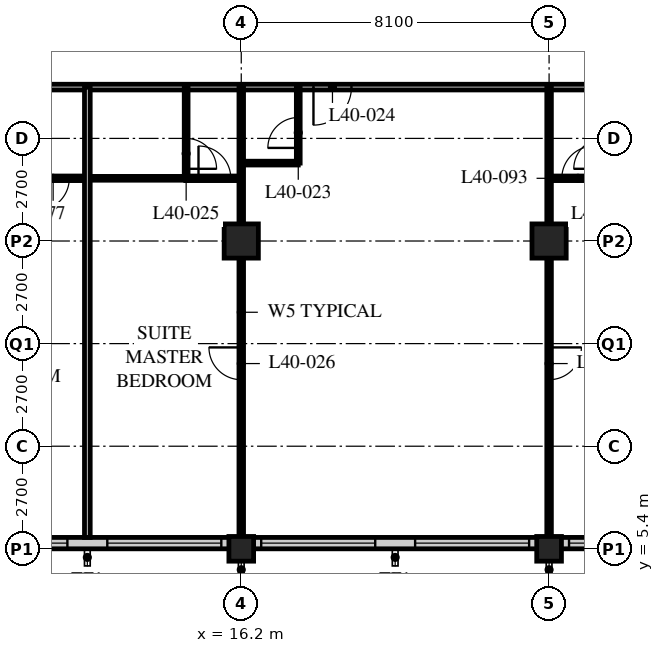
"""IFC4 building model, lengths in metres.
Left out: names, types, materials, properties, quantities, classifications, styles, units other than length and angle.
Written with IfcOpenShell. Run it as: python <this file> out.ifc"""

import sys

from ifc_helpers import new_model, si_unit, direction, frame, frame_2d, origin, origin_2d, place, context, subcontext, project, spatial, rectangle, hollow_rectangle, extrude, element, fill, save


model = new_model("IFC4")
c1 = context("Model", 3, precision=1e-05, world=origin(), true_north=direction((0.0, 1.0)))
c2 = subcontext(c1, "Body", "Model", "MODEL_VIEW")
j1 = project(units=[si_unit("LENGTHUNIT", "METRE"), si_unit("PLANEANGLEUNIT", "RADIAN")], contexts=[c1])
p1 = place(None, origin())
s1 = spatial("IfcSite", under=j1, at=p1, CompositionType="ELEMENT")
p2 = place(p1, origin())
s2 = spatial("IfcBuilding", under=s1, at=p2, CompositionType="ELEMENT")
p3 = place(p2, frame((0.0, 0.0, 154.4)))
s3 = spatial("IfcBuildingStorey", under=s2, at=p3, CompositionType="ELEMENT", Elevation=154.4)
p4 = place(p3, frame((16.2, 5.4, 0.0), z_axis=(0.0, 0.0, 1.0), x_axis=(1.0, 0.0, 0.0)))
e1 = element("IfcColumn", 1, at=p4, inside=s3, PredefinedType="COLUMN", context=c2, shape_type="SweptSolid", body=[
    extrude(hollow_rectangle(XDim=0.65, YDim=0.65, WallThickness=0.055, at=origin_2d()), origin(), (0.0, 0.0, 1.0), 3.4),
])
p5 = place(p3, frame((16.2, 13.5, 0.0), z_axis=(0.0, 0.0, 1.0), x_axis=(1.0, 0.0, 0.0)))
e2 = element("IfcColumn", 2, at=p5, inside=s3, PredefinedType="COLUMN", context=c2, shape_type="SweptSolid", body=[
    extrude(hollow_rectangle(XDim=0.9, YDim=0.9, WallThickness=0.1, at=origin_2d()), origin(), (0.0, 0.0, 1.0), 3.4),
])
p6 = place(p3, frame((24.3, 5.4, 0.0), z_axis=(0.0, 0.0, 1.0), x_axis=(1.0, 0.0, 0.0)))
e3 = element("IfcColumn", 3, at=p6, inside=s3, PredefinedType="COLUMN", context=c2, shape_type="SweptSolid", body=[
    extrude(hollow_rectangle(XDim=0.65, YDim=0.65, WallThickness=0.055, at=origin_2d()), origin(), (0.0, 0.0, 1.0), 3.4),
])
p7 = place(p3, frame((24.3, 13.5, 0.0), z_axis=(0.0, 0.0, 1.0), x_axis=(1.0, 0.0, 0.0)))
e4 = element("IfcColumn", 4, at=p7, inside=s3, PredefinedType="COLUMN", context=c2, shape_type="SweptSolid", body=[
    extrude(hollow_rectangle(XDim=0.9, YDim=0.9, WallThickness=0.1, at=origin_2d()), origin(), (0.0, 0.0, 1.0), 3.4),
])
p8 = place(p3, frame((8.4, 5.55, 0.0), z_axis=(0.0, 0.0, 1.0), x_axis=(1.0, 0.0, 0.0)))
e5 = element("IfcWall", 5, at=p8, inside=s3, PredefinedType="SOLIDWALL", context=c2, shape_type="SweptSolid", body=[
    extrude(rectangle(XDim=40.2, YDim=0.3, at=frame_2d((20.1, 0.0))), origin(), (0.0, 0.0, 1.0), 2.15),
])
p9 = place(p8, frame((0.225, 0.0, 0.9)))
e6 = element("IfcOpeningElement", 6, at=p9, cuts=e5, PredefinedType="OPENING", context=c2, shape_type="SweptSolid", body=[
    extrude(rectangle(XDim=3.0, YDim=1.2, at=frame_2d((1.5, 0.6))), frame((0.0, 0.16, 0.0), z_axis=(0.0, -1.0, 0.0), x_axis=(1.0, 0.0, 0.0)), (0.0, 0.0, 1.0), 0.32),
])
p10 = place(p8, frame((4.275, 0.0, 0.9)))
e7 = element("IfcOpeningElement", 7, at=p10, cuts=e5, PredefinedType="OPENING", context=c2, shape_type="SweptSolid", body=[
    extrude(rectangle(XDim=3.0, YDim=1.2, at=frame_2d((1.5, 0.6))), frame((0.0, 0.16, 0.0), z_axis=(0.0, -1.0, 0.0), x_axis=(1.0, 0.0, 0.0)), (0.0, 0.0, 1.0), 0.32),
])
p11 = place(p8, frame((8.325, 0.0, 0.9)))
e8 = element("IfcOpeningElement", 8, at=p11, cuts=e5, PredefinedType="OPENING", context=c2, shape_type="SweptSolid", body=[
    extrude(rectangle(XDim=3.0, YDim=1.2, at=frame_2d((1.5, 0.6))), frame((0.0, 0.16, 0.0), z_axis=(0.0, -1.0, 0.0), x_axis=(1.0, 0.0, 0.0)), (0.0, 0.0, 1.0), 0.32),
])
p12 = place(p8, frame((12.375, 0.0, 0.9)))
e9 = element("IfcOpeningElement", 9, at=p12, cuts=e5, PredefinedType="OPENING", context=c2, shape_type="SweptSolid", body=[
    extrude(rectangle(XDim=3.0, YDim=1.2, at=frame_2d((1.5, 0.6))), frame((0.0, 0.16, 0.0), z_axis=(0.0, -1.0, 0.0), x_axis=(1.0, 0.0, 0.0)), (0.0, 0.0, 1.0), 0.32),
])
p13 = place(p8, frame((16.425, 0.0, 0.9)))
e10 = element("IfcOpeningElement", 10, at=p13, cuts=e5, PredefinedType="OPENING", context=c2, shape_type="SweptSolid", body=[
    extrude(rectangle(XDim=3.0, YDim=1.2, at=frame_2d((1.5, 0.6))), frame((0.0, 0.16, 0.0), z_axis=(0.0, -1.0, 0.0), x_axis=(1.0, 0.0, 0.0)), (0.0, 0.0, 1.0), 0.32),
])
p14 = place(p8, frame((20.475, 0.0, 0.9)))
e11 = element("IfcOpeningElement", 11, at=p14, cuts=e5, PredefinedType="OPENING", context=c2, shape_type="SweptSolid", body=[
    extrude(rectangle(XDim=3.0, YDim=1.2, at=frame_2d((1.5, 0.6))), frame((0.0, 0.16, 0.0), z_axis=(0.0, -1.0, 0.0), x_axis=(1.0, 0.0, 0.0)), (0.0, 0.0, 1.0), 0.32),
])
p15 = place(p8, frame((24.525, 0.0, 0.9)))
e12 = element("IfcOpeningElement", 12, at=p15, cuts=e5, PredefinedType="OPENING", context=c2, shape_type="SweptSolid", body=[
    extrude(rectangle(XDim=3.0, YDim=1.2, at=frame_2d((1.5, 0.6))), frame((0.0, 0.16, 0.0), z_axis=(0.0, -1.0, 0.0), x_axis=(1.0, 0.0, 0.0)), (0.0, 0.0, 1.0), 0.32),
])
p16 = place(p8, frame((28.575, 0.0, 0.9)))
e13 = element("IfcOpeningElement", 13, at=p16, cuts=e5, PredefinedType="OPENING", context=c2, shape_type="SweptSolid", body=[
    extrude(rectangle(XDim=3.0, YDim=1.2, at=frame_2d((1.5, 0.6))), frame((0.0, 0.16, 0.0), z_axis=(0.0, -1.0, 0.0), x_axis=(1.0, 0.0, 0.0)), (0.0, 0.0, 1.0), 0.32),
])
p17 = place(p8, frame((32.625, 0.0, 0.9)))
e14 = element("IfcOpeningElement", 14, at=p17, cuts=e5, PredefinedType="OPENING", context=c2, shape_type="SweptSolid", body=[
    extrude(rectangle(XDim=3.0, YDim=1.2, at=frame_2d((1.5, 0.6))), frame((0.0, 0.16, 0.0), z_axis=(0.0, -1.0, 0.0), x_axis=(1.0, 0.0, 0.0)), (0.0, 0.0, 1.0), 0.32),
])
p18 = place(p8, frame((36.675, 0.0, 0.9)))
e15 = element("IfcOpeningElement", 15, at=p18, cuts=e5, PredefinedType="OPENING", context=c2, shape_type="SweptSolid", body=[
    extrude(rectangle(XDim=3.0, YDim=1.2, at=frame_2d((1.5, 0.6))), frame((0.0, 0.16, 0.0), z_axis=(0.0, -1.0, 0.0), x_axis=(1.0, 0.0, 0.0)), (0.0, 0.0, 1.0), 0.32),
])
p19 = place(p3, frame((8.1, 17.55, 0.0), z_axis=(0.0, 0.0, 1.0), x_axis=(1.0, 0.0, 0.0)))
e16 = element("IfcWall", 16, at=p19, inside=s3, PredefinedType="PARTITIONING", context=c2, shape_type="SweptSolid", body=[
    extrude(rectangle(XDim=40.5, YDim=0.15, at=frame_2d((20.25, 0.0))), origin(), (0.0, 0.0, 1.0), 3.15),
])
p20 = place(p19, frame((10.0, 0.0, 0.0)))
e17 = element("IfcOpeningElement", 17, at=p20, cuts=e16, PredefinedType="OPENING", context=c2, shape_type="SweptSolid", body=[
    extrude(rectangle(XDim=1.0, YDim=2.1, at=frame_2d((0.5, 1.05))), frame((0.0, 0.085, 0.0), z_axis=(0.0, -1.0, 0.0), x_axis=(1.0, 0.0, 0.0)), (0.0, 0.0, 1.0), 0.17),
])
p21 = place(p19, frame((22.15, 0.0, 0.0)))
e18 = element("IfcOpeningElement", 18, at=p21, cuts=e16, PredefinedType="OPENING", context=c2, shape_type="SweptSolid", body=[
    extrude(rectangle(XDim=1.0, YDim=2.1, at=frame_2d((0.5, 1.05))), frame((0.0, 0.085, 0.0), z_axis=(0.0, -1.0, 0.0), x_axis=(1.0, 0.0, 0.0)), (0.0, 0.0, 1.0), 0.17),
])
p22 = place(p19, frame((30.8, 0.0, 0.0)))
e19 = element("IfcOpeningElement", 19, at=p22, cuts=e16, PredefinedType="OPENING", context=c2, shape_type="SweptSolid", body=[
    extrude(rectangle(XDim=1.0, YDim=2.1, at=frame_2d((0.5, 1.05))), frame((0.0, 0.085, 0.0), z_axis=(0.0, -1.0, 0.0), x_axis=(1.0, 0.0, 0.0)), (0.0, 0.0, 1.0), 0.17),
])
p23 = place(p19, frame((34.85, 0.0, 0.0)))
e20 = element("IfcOpeningElement", 20, at=p23, cuts=e16, PredefinedType="OPENING", context=c2, shape_type="SweptSolid", body=[
    extrude(rectangle(XDim=1.0, YDim=2.1, at=frame_2d((0.5, 1.05))), frame((0.0, 0.085, 0.0), z_axis=(0.0, -1.0, 0.0), x_axis=(1.0, 0.0, 0.0)), (0.0, 0.0, 1.0), 0.17),
])
p24 = place(p19, frame((1.525, 0.0, 0.0)))
e21 = element("IfcOpeningElement", 21, at=p24, cuts=e16, PredefinedType="OPENING", context=c2, shape_type="SweptSolid", body=[
    extrude(rectangle(XDim=1.0, YDim=2.1, at=frame_2d((0.5, 1.05))), frame((0.0, 0.085, 0.0), z_axis=(0.0, -1.0, 0.0), x_axis=(1.0, 0.0, 0.0)), (0.0, 0.0, 1.0), 0.17),
])
p25 = place(p19, frame((37.975, 0.0, 0.0)))
e22 = element("IfcOpeningElement", 22, at=p25, cuts=e16, PredefinedType="OPENING", context=c2, shape_type="SweptSolid", body=[
    extrude(rectangle(XDim=1.0, YDim=2.1, at=frame_2d((0.5, 1.05))), frame((0.0, 0.085, 0.0), z_axis=(0.0, -1.0, 0.0), x_axis=(1.0, 0.0, 0.0)), (0.0, 0.0, 1.0), 0.17),
])
p26 = place(p3, frame((16.2, 15.55, 0.0), z_axis=(0.0, 0.0, 1.0), x_axis=(1.0, 0.0, 0.0)))
e23 = element("IfcWall", 23, at=p26, inside=s3, PredefinedType="PARTITIONING", context=c2, shape_type="SweptSolid", body=[
    extrude(rectangle(XDim=1.5, YDim=0.1, at=frame_2d((0.75, 0.0))), origin(), (0.0, 0.0, 1.0), 3.15),
])
p27 = place(p3, frame((17.7, 17.55, 0.0), z_axis=(0.0, 0.0, 1.0), x_axis=(0.0, -1.0, 0.0)))
e24 = element("IfcWall", 24, at=p27, inside=s3, PredefinedType="PARTITIONING", context=c2, shape_type="SweptSolid", body=[
    extrude(rectangle(XDim=2.0, YDim=0.1, at=frame_2d((1.0, 0.0))), origin(), (0.0, 0.0, 1.0), 3.15),
])
p28 = place(p27, frame((0.8, 0.0, 0.0)))
e25 = element("IfcOpeningElement", 25, at=p28, cuts=e24, PredefinedType="OPENING", context=c2, shape_type="SweptSolid", body=[
    extrude(rectangle(XDim=0.8, YDim=2.1, at=frame_2d((0.4, 1.05))), frame((0.0, 0.06, 0.0), z_axis=(0.0, -1.0, 0.0), x_axis=(1.0, 0.0, 0.0)), (0.0, 0.0, 1.0), 0.12),
])
p29 = place(p3, frame((12.15, 15.15, 0.0), z_axis=(0.0, 0.0, 1.0), x_axis=(1.0, 0.0, 0.0)))
e26 = element("IfcWall", 26, at=p29, inside=s3, PredefinedType="PARTITIONING", context=c2, shape_type="SweptSolid", body=[
    extrude(rectangle(XDim=2.6, YDim=0.1, at=frame_2d((1.3, 0.0))), origin(), (0.0, 0.0, 1.0), 3.15),
])
p30 = place(p3, frame((14.75, 17.55, 0.0), z_axis=(0.0, 0.0, 1.0), x_axis=(0.0, -1.0, 0.0)))
e27 = element("IfcWall", 27, at=p30, inside=s3, PredefinedType="PARTITIONING", context=c2, shape_type="SweptSolid", body=[
    extrude(rectangle(XDim=2.4, YDim=0.1, at=frame_2d((1.2, 0.0))), origin(), (0.0, 0.0, 1.0), 3.15),
])
p31 = place(p30, frame((1.35, 0.0, 0.0)))
e28 = element("IfcOpeningElement", 28, at=p31, cuts=e27, PredefinedType="OPENING", context=c2, shape_type="SweptSolid", body=[
    extrude(rectangle(XDim=0.8, YDim=2.1, at=frame_2d((0.4, 1.05))), frame((0.0, 0.06, 0.0), z_axis=(0.0, -1.0, 0.0), x_axis=(1.0, 0.0, 0.0)), (0.0, 0.0, 1.0), 0.12),
])
p32 = place(p3, frame((16.2, 17.55, 0.0), z_axis=(0.0, 0.0, 1.0), x_axis=(0.0, -1.0, 0.0)))
e29 = element("IfcWall", 29, at=p32, inside=s3, PredefinedType="PARTITIONING", context=c2, shape_type="SweptSolid", body=[
    extrude(rectangle(XDim=11.85, YDim=0.12, at=frame_2d((5.925, 0.0))), origin(), (0.0, 0.0, 1.0), 2.15),
])
p33 = place(p32, frame((6.85, 0.0, 0.0)))
e30 = element("IfcOpeningElement", 30, at=p33, cuts=e29, PredefinedType="OPENING", context=c2, shape_type="SweptSolid", body=[
    extrude(rectangle(XDim=0.85, YDim=2.1, at=frame_2d((0.425, 1.05))), frame((0.0, 0.07, 0.0), z_axis=(0.0, -1.0, 0.0), x_axis=(1.0, 0.0, 0.0)), (0.0, 0.0, 1.0), 0.14),
])
p34 = place(p3, frame((24.3, 17.55, 0.0), z_axis=(0.0, 0.0, 1.0), x_axis=(0.0, -1.0, 0.0)))
e31 = element("IfcWall", 31, at=p34, inside=s3, PredefinedType="PARTITIONING", context=c2, shape_type="SweptSolid", body=[
    extrude(rectangle(XDim=11.85, YDim=0.12, at=frame_2d((5.925, 0.0))), origin(), (0.0, 0.0, 1.0), 2.15),
])
p35 = place(p34, frame((6.85, 0.0, 0.0)))
e32 = element("IfcOpeningElement", 32, at=p35, cuts=e31, PredefinedType="OPENING", context=c2, shape_type="SweptSolid", body=[
    extrude(rectangle(XDim=0.85, YDim=2.1, at=frame_2d((0.425, 1.05))), frame((0.0, 0.07, 0.0), z_axis=(0.0, -1.0, 0.0), x_axis=(1.0, 0.0, 0.0)), (0.0, 0.0, 1.0), 0.14),
])
p36 = place(p3, frame((4.1, 15.15, 0.0), z_axis=(0.0, 0.0, 1.0), x_axis=(1.0, 0.0, 0.0)))
e33 = element("IfcWall", 33, at=p36, inside=s3, PredefinedType="PARTITIONING", context=c2, shape_type="SweptSolid", body=[
    extrude(rectangle(XDim=8.05, YDim=0.12, at=frame_2d((4.025, 0.0))), origin(), (0.0, 0.0, 1.0), 3.15),
])
p37 = place(p36, frame((6.725, 0.0, 0.0)))
e34 = element("IfcOpeningElement", 34, at=p37, cuts=e33, PredefinedType="OPENING", context=c2, shape_type="SweptSolid", body=[
    extrude(rectangle(XDim=0.85, YDim=2.1, at=frame_2d((0.425, 1.05))), frame((0.0, 0.07, 0.0), z_axis=(0.0, -1.0, 0.0), x_axis=(1.0, 0.0, 0.0)), (0.0, 0.0, 1.0), 0.14),
])
p38 = place(p36, frame((2.875, 0.0, 0.0)))
e35 = element("IfcOpeningElement", 35, at=p38, cuts=e33, PredefinedType="OPENING", context=c2, shape_type="SweptSolid", body=[
    extrude(rectangle(XDim=0.85, YDim=2.1, at=frame_2d((0.425, 1.05))), frame((0.0, 0.07, 0.0), z_axis=(0.0, -1.0, 0.0), x_axis=(1.0, 0.0, 0.0)), (0.0, 0.0, 1.0), 0.14),
])
p39 = place(p3, frame((12.15, 17.55, 0.0), z_axis=(0.0, 0.0, 1.0), x_axis=(0.0, -1.0, 0.0)))
e36 = element("IfcWall", 36, at=p39, inside=s3, PredefinedType="PARTITIONING", context=c2, shape_type="SweptSolid", body=[
    extrude(rectangle(XDim=11.85, YDim=0.15, at=frame_2d((5.925, 0.0))), origin(), (0.0, 0.0, 1.0), 3.15),
])
p40 = place(p3, frame((16.2, 15.15, 0.0), z_axis=(0.0, 0.0, 1.0), x_axis=(-1.0, 0.0, 0.0)))
e37 = element("IfcWall", 37, at=p40, inside=s3, PredefinedType="PARTITIONING", context=c2, shape_type="SweptSolid", body=[
    extrude(rectangle(XDim=1.46, YDim=0.12, at=frame_2d((0.73, 0.0))), origin(), (0.0, 0.0, 1.0), 3.15),
])
p41 = place(p40, frame((0.275, 0.0, 0.0)))
e38 = element("IfcOpeningElement", 38, at=p41, cuts=e37, PredefinedType="OPENING", context=c2, shape_type="SweptSolid", body=[
    extrude(rectangle(XDim=0.85, YDim=2.1, at=frame_2d((0.425, 1.05))), frame((0.0, 0.07, 0.0), z_axis=(0.0, -1.0, 0.0), x_axis=(1.0, 0.0, 0.0)), (0.0, 0.0, 1.0), 0.14),
])
p42 = place(p3, frame((25.76, 15.15, 0.0), z_axis=(0.0, 0.0, 1.0), x_axis=(-1.0, 0.0, 0.0)))
e39 = element("IfcWall", 39, at=p42, inside=s3, PredefinedType="PARTITIONING", context=c2, shape_type="SweptSolid", body=[
    extrude(rectangle(XDim=1.46, YDim=0.12, at=frame_2d((0.73, 0.0))), origin(), (0.0, 0.0, 1.0), 3.15),
])
p43 = place(p42, frame((0.275, 0.0, 0.0)))
e40 = element("IfcOpeningElement", 40, at=p43, cuts=e39, PredefinedType="OPENING", context=c2, shape_type="SweptSolid", body=[
    extrude(rectangle(XDim=0.85, YDim=2.1, at=frame_2d((0.425, 1.05))), frame((0.0, 0.07, 0.0), z_axis=(0.0, -1.0, 0.0), x_axis=(1.0, 0.0, 0.0)), (0.0, 0.0, 1.0), 0.14),
])
p44 = place(p9, origin())
e41 = element("IfcWindow", 41, at=p44, inside=s3, PartitioningType="SINGLE_PANEL", PredefinedType="WINDOW", context=c2, shape_type="SweptSolid", body=[
    extrude(rectangle(XDim=3.0, YDim=1.2, at=frame_2d((1.5, 0.6))), frame((0.0, 0.03, 0.0), z_axis=(0.0, -1.0, 0.0), x_axis=(1.0, 0.0, 0.0)), (0.0, 0.0, 1.0), 0.06),
])
fill(e6, e41)
p45 = place(p10, origin())
e42 = element("IfcWindow", 42, at=p45, inside=s3, PartitioningType="SINGLE_PANEL", PredefinedType="WINDOW", context=c2, shape_type="SweptSolid", body=[
    extrude(rectangle(XDim=3.0, YDim=1.2, at=frame_2d((1.5, 0.6))), frame((0.0, 0.03, 0.0), z_axis=(0.0, -1.0, 0.0), x_axis=(1.0, 0.0, 0.0)), (0.0, 0.0, 1.0), 0.06),
])
fill(e7, e42)
p46 = place(p11, origin())
e43 = element("IfcWindow", 43, at=p46, inside=s3, PartitioningType="SINGLE_PANEL", PredefinedType="WINDOW", context=c2, shape_type="SweptSolid", body=[
    extrude(rectangle(XDim=3.0, YDim=1.2, at=frame_2d((1.5, 0.6))), frame((0.0, 0.03, 0.0), z_axis=(0.0, -1.0, 0.0), x_axis=(1.0, 0.0, 0.0)), (0.0, 0.0, 1.0), 0.06),
])
fill(e8, e43)
p47 = place(p12, origin())
e44 = element("IfcWindow", 44, at=p47, inside=s3, PartitioningType="SINGLE_PANEL", PredefinedType="WINDOW", context=c2, shape_type="SweptSolid", body=[
    extrude(rectangle(XDim=3.0, YDim=1.2, at=frame_2d((1.5, 0.6))), frame((0.0, 0.03, 0.0), z_axis=(0.0, -1.0, 0.0), x_axis=(1.0, 0.0, 0.0)), (0.0, 0.0, 1.0), 0.06),
])
fill(e9, e44)
p48 = place(p13, origin())
e45 = element("IfcWindow", 45, at=p48, inside=s3, PartitioningType="SINGLE_PANEL", PredefinedType="WINDOW", context=c2, shape_type="SweptSolid", body=[
    extrude(rectangle(XDim=3.0, YDim=1.2, at=frame_2d((1.5, 0.6))), frame((0.0, 0.03, 0.0), z_axis=(0.0, -1.0, 0.0), x_axis=(1.0, 0.0, 0.0)), (0.0, 0.0, 1.0), 0.06),
])
fill(e10, e45)
p49 = place(p28, origin())
e46 = element("IfcDoor", 46, at=p49, inside=s3, OperationType="SINGLE_SWING_LEFT", PredefinedType="DOOR", context=c2, shape_type="SweptSolid", body=[
    extrude(rectangle(XDim=0.8, YDim=2.1, at=frame_2d((0.4, 1.05))), frame((0.0, 0.025, 0.0), z_axis=(0.0, -1.0, 0.0), x_axis=(1.0, 0.0, 0.0)), (0.0, 0.0, 1.0), 0.05),
])
fill(e25, e46)
p50 = place(p20, origin())
e47 = element("IfcDoor", 47, at=p50, inside=s3, OperationType="SINGLE_SWING_RIGHT", PredefinedType="DOOR", context=c2, shape_type="SweptSolid", body=[
    extrude(rectangle(XDim=1.0, YDim=2.1, at=frame_2d((0.5, 1.05))), frame((0.0, 0.025, 0.0), z_axis=(0.0, -1.0, 0.0), x_axis=(1.0, 0.0, 0.0)), (0.0, 0.0, 1.0), 0.05),
])
fill(e17, e47)
p51 = place(p31, origin())
e48 = element("IfcDoor", 48, at=p51, inside=s3, OperationType="SINGLE_SWING_RIGHT", PredefinedType="DOOR", context=c2, shape_type="SweptSolid", body=[
    extrude(rectangle(XDim=0.8, YDim=2.1, at=frame_2d((0.4, 1.05))), frame((0.0, 0.025, 0.0), z_axis=(0.0, -1.0, 0.0), x_axis=(1.0, 0.0, 0.0)), (0.0, 0.0, 1.0), 0.05),
])
fill(e28, e48)
p52 = place(p33, origin())
e49 = element("IfcDoor", 49, at=p52, inside=s3, OperationType="SINGLE_SWING_RIGHT", PredefinedType="DOOR", context=c2, shape_type="SweptSolid", body=[
    extrude(rectangle(XDim=0.85, YDim=2.1, at=frame_2d((0.425, 1.05))), frame((0.0, 0.025, 0.0), z_axis=(0.0, -1.0, 0.0), x_axis=(1.0, 0.0, 0.0)), (0.0, 0.0, 1.0), 0.05),
])
fill(e30, e49)
p53 = place(p35, origin())
e50 = element("IfcDoor", 50, at=p53, inside=s3, OperationType="SINGLE_SWING_LEFT", PredefinedType="DOOR", context=c2, shape_type="SweptSolid", body=[
    extrude(rectangle(XDim=0.85, YDim=2.1, at=frame_2d((0.425, 1.05))), frame((0.0, 0.025, 0.0), z_axis=(0.0, -1.0, 0.0), x_axis=(1.0, 0.0, 0.0)), (0.0, 0.0, 1.0), 0.05),
])
fill(e32, e50)
p54 = place(p37, origin())
e51 = element("IfcDoor", 51, at=p54, inside=s3, OperationType="SINGLE_SWING_RIGHT", PredefinedType="DOOR", context=c2, shape_type="SweptSolid", body=[
    extrude(rectangle(XDim=0.85, YDim=2.1, at=frame_2d((0.425, 1.05))), frame((0.0, 0.025, 0.0), z_axis=(0.0, -1.0, 0.0), x_axis=(1.0, 0.0, 0.0)), (0.0, 0.0, 1.0), 0.05),
])
fill(e34, e51)
p55 = place(p41, origin())
e52 = element("IfcDoor", 52, at=p55, inside=s3, OperationType="SINGLE_SWING_LEFT", PredefinedType="DOOR", context=c2, shape_type="SweptSolid", body=[
    extrude(rectangle(XDim=0.85, YDim=2.1, at=frame_2d((0.425, 1.05))), frame((0.0, 0.025, 0.0), z_axis=(0.0, -1.0, 0.0), x_axis=(1.0, 0.0, 0.0)), (0.0, 0.0, 1.0), 0.05),
])
fill(e38, e52)
p56 = place(p43, origin())
e53 = element("IfcDoor", 53, at=p56, inside=s3, OperationType="SINGLE_SWING_RIGHT", PredefinedType="DOOR", context=c2, shape_type="SweptSolid", body=[
    extrude(rectangle(XDim=0.85, YDim=2.1, at=frame_2d((0.425, 1.05))), frame((0.0, 0.025, 0.0), z_axis=(0.0, -1.0, 0.0), x_axis=(1.0, 0.0, 0.0)), (0.0, 0.0, 1.0), 0.05),
])
fill(e40, e53)
save(model, sys.argv[1])
